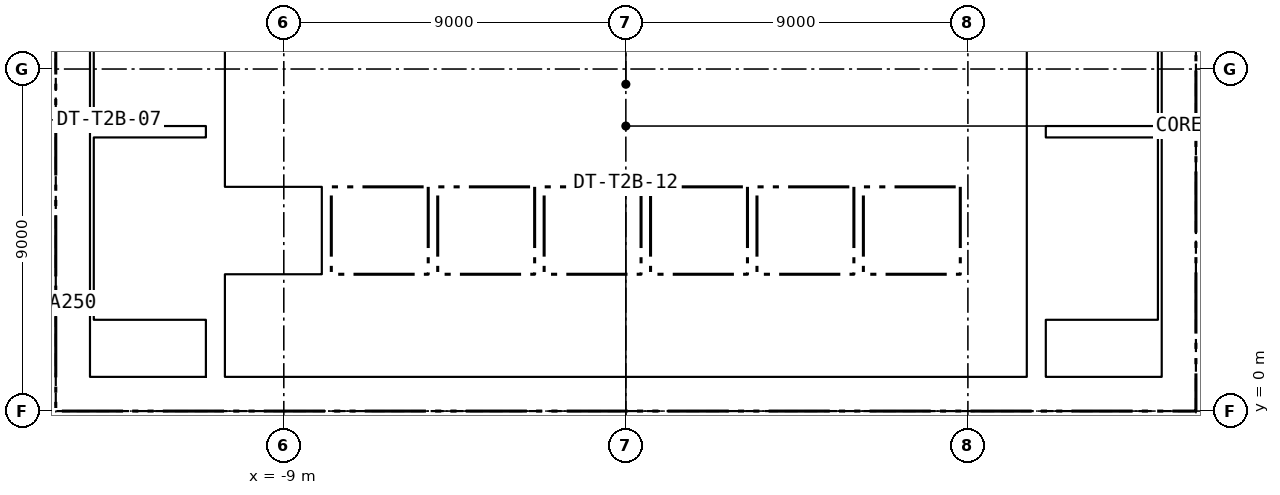
"""IFC4 building model, lengths in metres.
Left out: names, types, materials, properties, quantities, classifications, styles, units other than length and angle.
Written with IfcOpenShell. Run it as: python <this file> out.ifc"""

import sys

from ifc_helpers import new_model, si_unit, direction, frame, frame_2d, origin, place, context, subcontext, project, spatial, rectangle, extrude, element, fill, save


model = new_model("IFC4")
c1 = context("Model", 3, precision=1e-05, world=origin(), true_north=direction((0.0, 1.0)))
c2 = subcontext(c1, "Body", "Model", "MODEL_VIEW")
j1 = project(units=[si_unit("LENGTHUNIT", "METRE"), si_unit("PLANEANGLEUNIT", "RADIAN")], contexts=[c1])
p1 = place(None, origin())
s1 = spatial("IfcSite", under=j1, at=p1, CompositionType="ELEMENT")
p2 = place(p1, origin())
s2 = spatial("IfcBuilding", under=s1, at=p2, CompositionType="ELEMENT")
p3 = place(p2, frame((0.0, 0.0, 91.6)))
s3 = spatial("IfcBuildingStorey", under=s2, at=p3, CompositionType="ELEMENT", Elevation=91.6)
p4 = place(p3, frame((-15.0, 0.45, -0.15), z_axis=(0.0, 0.0, 1.0), x_axis=(1.0, 0.0, 0.0)))
e1 = element("IfcWall", 1, at=p4, inside=s3, PredefinedType="SOLIDWALL", context=c2, shape_type="SweptSolid", body=[
    extrude(rectangle(XDim=30.0, YDim=0.9, at=frame_2d((15.0, 0.0))), origin(), (0.0, 0.0, 1.0), 3.65),
])
p5 = place(p4, frame((5.8, 0.0, 0.15)))
e2 = element("IfcOpeningElement", 2, at=p5, cuts=e1, PredefinedType="OPENING", context=c2, shape_type="SweptSolid", body=[
    extrude(rectangle(XDim=2.4, YDim=2.4, at=frame_2d((1.2, 1.2))), frame((0.0, 0.46, 0.0), z_axis=(0.0, -1.0, 0.0), x_axis=(1.0, 0.0, 0.0)), (0.0, 0.0, 1.0), 0.92),
])
p6 = place(p4, frame((13.8, 0.0, 0.15)))
e3 = element("IfcOpeningElement", 3, at=p6, cuts=e1, PredefinedType="OPENING", context=c2, shape_type="SweptSolid", body=[
    extrude(rectangle(XDim=2.4, YDim=2.4, at=frame_2d((1.2, 1.2))), frame((0.0, 0.46, 0.0), z_axis=(0.0, -1.0, 0.0), x_axis=(1.0, 0.0, 0.0)), (0.0, 0.0, 1.0), 0.92),
])
p7 = place(p4, frame((21.8, 0.0, 0.15)))
e4 = element("IfcOpeningElement", 4, at=p7, cuts=e1, PredefinedType="OPENING", context=c2, shape_type="SweptSolid", body=[
    extrude(rectangle(XDim=2.4, YDim=2.4, at=frame_2d((1.2, 1.2))), frame((0.0, 0.46, 0.0), z_axis=(0.0, -1.0, 0.0), x_axis=(1.0, 0.0, 0.0)), (0.0, 0.0, 1.0), 0.92),
])
p8 = place(p4, frame((1.5, 0.0, 0.15)))
e5 = element("IfcOpeningElement", 5, at=p8, cuts=e1, PredefinedType="OPENING", context=c2, shape_type="SweptSolid", body=[
    extrude(rectangle(XDim=1.2, YDim=2.1, at=frame_2d((0.6, 1.05))), frame((0.0, 0.46, 0.0), z_axis=(0.0, -1.0, 0.0), x_axis=(1.0, 0.0, 0.0)), (0.0, 0.0, 1.0), 0.92),
])
p9 = place(p4, frame((27.3, 0.0, 0.15)))
e6 = element("IfcOpeningElement", 6, at=p9, cuts=e1, PredefinedType="OPENING", context=c2, shape_type="SweptSolid", body=[
    extrude(rectangle(XDim=1.2, YDim=2.1, at=frame_2d((0.6, 1.05))), frame((0.0, 0.46, 0.0), z_axis=(0.0, -1.0, 0.0), x_axis=(1.0, 0.0, 0.0)), (0.0, 0.0, 1.0), 0.92),
])
for number, where, z_axis, x_axis in (
    (7, (-14.55, 0.9, -0.15), (0.0, 0.0, 1.0), (0.0, 1.0, 0.0)),
    (8, (14.55, 0.9, -0.15), (0.0, 0.0, 1.0), (0.0, 1.0, 0.0)),
):
    element("IfcWall", number, at=place(p3, frame(where, z_axis=z_axis, x_axis=x_axis)), inside=s3, PredefinedType="SOLIDWALL", context=c2, shape_type="SweptSolid", body=[
        extrude(rectangle(XDim=13.2, YDim=0.9, at=frame_2d((6.6, 0.0))), origin(), (0.0, 0.0, 1.0), 3.65),
    ])
for number, where, z_axis, x_axis in (
    (9, (-10.8, 0.9, -0.15), (0.0, 0.0, 1.0), (0.0, 1.0, 0.0)),
    (10, (10.8, 0.9, -0.15), (0.0, 0.0, 1.0), (0.0, 1.0, 0.0)),
):
    element("IfcWall", number, at=place(p3, frame(where, z_axis=z_axis, x_axis=x_axis)), inside=s3, PredefinedType="SOLIDWALL", context=c2, shape_type="SweptSolid", body=[
        extrude(rectangle(XDim=13.2, YDim=0.5, at=frame_2d((6.6, 0.0))), origin(), (0.0, 0.0, 1.0), 3.65),
    ])
p10 = place(p3, frame((-10.55, 3.5, 0.0), z_axis=(0.0, 0.0, 1.0), x_axis=(1.0, 0.0, 0.0)))
e11 = element("IfcWall", 11, at=p10, inside=s3, PredefinedType="PARTITIONING", context=c2, shape_type="SweptSolid", body=[
    extrude(rectangle(XDim=21.1, YDim=0.2, at=frame_2d((10.55, 0.0))), origin(), (0.0, 0.0, 1.0), 3.5),
])
p11 = place(p10, frame((0.675, 0.0, 0.0)))
e12 = element("IfcOpeningElement", 12, at=p11, cuts=e11, PredefinedType="OPENING", context=c2, shape_type="SweptSolid", body=[
    extrude(rectangle(XDim=1.2, YDim=2.1, at=frame_2d((0.6, 1.05))), frame((0.0, 0.11, 0.0), z_axis=(0.0, -1.0, 0.0), x_axis=(1.0, 0.0, 0.0)), (0.0, 0.0, 1.0), 0.22),
])
p12 = place(p10, frame((3.475, 0.0, 0.0)))
e13 = element("IfcOpeningElement", 13, at=p12, cuts=e11, PredefinedType="OPENING", context=c2, shape_type="SweptSolid", body=[
    extrude(rectangle(XDim=1.2, YDim=2.1, at=frame_2d((0.6, 1.05))), frame((0.0, 0.11, 0.0), z_axis=(0.0, -1.0, 0.0), x_axis=(1.0, 0.0, 0.0)), (0.0, 0.0, 1.0), 0.22),
])
p13 = place(p10, frame((6.275, 0.0, 0.0)))
e14 = element("IfcOpeningElement", 14, at=p13, cuts=e11, PredefinedType="OPENING", context=c2, shape_type="SweptSolid", body=[
    extrude(rectangle(XDim=1.2, YDim=2.1, at=frame_2d((0.6, 1.05))), frame((0.0, 0.11, 0.0), z_axis=(0.0, -1.0, 0.0), x_axis=(1.0, 0.0, 0.0)), (0.0, 0.0, 1.0), 0.22),
])
p14 = place(p10, frame((9.075, 0.0, 0.0)))
e15 = element("IfcOpeningElement", 15, at=p14, cuts=e11, PredefinedType="OPENING", context=c2, shape_type="SweptSolid", body=[
    extrude(rectangle(XDim=1.2, YDim=2.1, at=frame_2d((0.6, 1.05))), frame((0.0, 0.11, 0.0), z_axis=(0.0, -1.0, 0.0), x_axis=(1.0, 0.0, 0.0)), (0.0, 0.0, 1.0), 0.22),
])
p15 = place(p10, frame((11.875, 0.0, 0.0)))
e16 = element("IfcOpeningElement", 16, at=p15, cuts=e11, PredefinedType="OPENING", context=c2, shape_type="SweptSolid", body=[
    extrude(rectangle(XDim=1.2, YDim=2.1, at=frame_2d((0.6, 1.05))), frame((0.0, 0.11, 0.0), z_axis=(0.0, -1.0, 0.0), x_axis=(1.0, 0.0, 0.0)), (0.0, 0.0, 1.0), 0.22),
])
p16 = place(p10, frame((14.675, 0.0, 0.0)))
e17 = element("IfcOpeningElement", 17, at=p16, cuts=e11, PredefinedType="OPENING", context=c2, shape_type="SweptSolid", body=[
    extrude(rectangle(XDim=1.2, YDim=2.1, at=frame_2d((0.6, 1.05))), frame((0.0, 0.11, 0.0), z_axis=(0.0, -1.0, 0.0), x_axis=(1.0, 0.0, 0.0)), (0.0, 0.0, 1.0), 0.22),
])
p17 = place(p10, frame((17.475, 0.0, 0.0)))
e18 = element("IfcOpeningElement", 18, at=p17, cuts=e11, PredefinedType="OPENING", context=c2, shape_type="SweptSolid", body=[
    extrude(rectangle(XDim=1.2, YDim=2.1, at=frame_2d((0.6, 1.05))), frame((0.0, 0.11, 0.0), z_axis=(0.0, -1.0, 0.0), x_axis=(1.0, 0.0, 0.0)), (0.0, 0.0, 1.0), 0.22),
])
p18 = place(p10, frame((19.9, 0.0, 0.0)))
e19 = element("IfcOpeningElement", 19, at=p18, cuts=e11, PredefinedType="OPENING", context=c2, shape_type="SweptSolid", body=[
    extrude(rectangle(XDim=0.9, YDim=2.1, at=frame_2d((0.45, 1.05))), frame((0.0, 0.11, 0.0), z_axis=(0.0, -1.0, 0.0), x_axis=(1.0, 0.0, 0.0)), (0.0, 0.0, 1.0), 0.22),
])
p19 = place(p3, frame((-10.55, 6.025, 0.0), z_axis=(0.0, 0.0, 1.0), x_axis=(1.0, 0.0, 0.0)))
e20 = element("IfcWall", 20, at=p19, inside=s3, PredefinedType="PARTITIONING", context=c2, shape_type="SweptSolid", body=[
    extrude(rectangle(XDim=21.1, YDim=0.25, at=frame_2d((10.55, 0.0))), origin(), (0.0, 0.0, 1.0), 3.5),
])
p20 = place(p3, frame((-4.125, 8.55, 0.0), z_axis=(0.0, 0.0, 1.0), x_axis=(1.0, 0.0, 0.0)))
e21 = element("IfcWall", 21, at=p20, inside=s3, PredefinedType="PARTITIONING", context=c2, shape_type="SweptSolid", body=[
    extrude(rectangle(XDim=14.675, YDim=0.2, at=frame_2d((7.337, 0.0))), origin(), (0.0, 0.0, 1.0), 3.5),
])
p21 = place(p20, frame((2.438, 0.0, 0.0)))
e22 = element("IfcOpeningElement", 22, at=p21, cuts=e21, PredefinedType="OPENING", context=c2, shape_type="SweptSolid", body=[
    extrude(rectangle(XDim=1.0, YDim=2.1, at=frame_2d((0.5, 1.05))), frame((0.0, 0.11, 0.0), z_axis=(0.0, -1.0, 0.0), x_axis=(1.0, 0.0, 0.0)), (0.0, 0.0, 1.0), 0.22),
])
p22 = place(p20, frame((6.775, 0.0, 0.0)))
e23 = element("IfcOpeningElement", 23, at=p22, cuts=e21, PredefinedType="OPENING", context=c2, shape_type="SweptSolid", body=[
    extrude(rectangle(XDim=1.0, YDim=2.1, at=frame_2d((0.5, 1.05))), frame((0.0, 0.11, 0.0), z_axis=(0.0, -1.0, 0.0), x_axis=(1.0, 0.0, 0.0)), (0.0, 0.0, 1.0), 0.22),
])
p23 = place(p20, frame((10.363, 0.0, 0.0)))
e24 = element("IfcOpeningElement", 24, at=p23, cuts=e21, PredefinedType="OPENING", context=c2, shape_type="SweptSolid", body=[
    extrude(rectangle(XDim=1.0, YDim=2.1, at=frame_2d((0.5, 1.05))), frame((0.0, 0.11, 0.0), z_axis=(0.0, -1.0, 0.0), x_axis=(1.0, 0.0, 0.0)), (0.0, 0.0, 1.0), 0.22),
])
p24 = place(p20, frame((13.475, 0.0, 0.0)))
e25 = element("IfcOpeningElement", 25, at=p24, cuts=e21, PredefinedType="OPENING", context=c2, shape_type="SweptSolid", body=[
    extrude(rectangle(XDim=0.9, YDim=2.1, at=frame_2d((0.45, 1.05))), frame((0.0, 0.11, 0.0), z_axis=(0.0, -1.0, 0.0), x_axis=(1.0, 0.0, 0.0)), (0.0, 0.0, 1.0), 0.22),
])
p25 = place(p3, frame((-4.125, 6.15, 0.0), z_axis=(0.0, 0.0, 1.0), x_axis=(0.0, 1.0, 0.0)))
e26 = element("IfcWall", 26, at=p25, inside=s3, PredefinedType="PARTITIONING", context=c2, shape_type="SweptSolid", body=[
    extrude(rectangle(XDim=4.95, YDim=0.25, at=frame_2d((2.475, 0.0))), origin(), (0.0, 0.0, 1.0), 3.5),
])
p26 = place(p25, frame((3.125, 0.0, 0.0)))
e27 = element("IfcOpeningElement", 27, at=p26, cuts=e26, PredefinedType="OPENING", context=c2, shape_type="SweptSolid", body=[
    extrude(rectangle(XDim=1.2, YDim=2.1, at=frame_2d((0.6, 1.05))), frame((0.0, 0.135, 0.0), z_axis=(0.0, -1.0, 0.0), x_axis=(1.0, 0.0, 0.0)), (0.0, 0.0, 1.0), 0.27),
])
for number, where, z_axis, x_axis in (
    (28, (-7.875, 3.6, 0.0), (0.0, 0.0, 1.0), (0.0, 1.0, 0.0)),
    (29, (-5.075, 3.6, 0.0), (0.0, 0.0, 1.0), (0.0, 1.0, 0.0)),
    (30, (-2.275, 3.6, 0.0), (0.0, 0.0, 1.0), (0.0, 1.0, 0.0)),
    (31, (0.525, 3.6, 0.0), (0.0, 0.0, 1.0), (0.0, 1.0, 0.0)),
    (32, (3.325, 3.6, 0.0), (0.0, 0.0, 1.0), (0.0, 1.0, 0.0)),
    (33, (6.125, 3.6, 0.0), (0.0, 0.0, 1.0), (0.0, 1.0, 0.0)),
    (34, (8.925, 3.6, 0.0), (0.0, 0.0, 1.0), (0.0, 1.0, 0.0)),
):
    element("IfcWall", number, at=place(p3, frame(where, z_axis=z_axis, x_axis=x_axis)), inside=s3, PredefinedType="PARTITIONING", context=c2, shape_type="SweptSolid", body=[
        extrude(rectangle(XDim=2.3, YDim=0.25, at=frame_2d((1.15, 0.0))), origin(), (0.0, 0.0, 1.0), 3.5),
    ])
for number, where, z_axis, x_axis in (
    (35, (1.7, 6.15, 0.0), (0.0, 0.0, 1.0), (0.0, 1.0, 0.0)),
    (36, (4.6, 6.15, 0.0), (0.0, 0.0, 1.0), (0.0, 1.0, 0.0)),
):
    element("IfcWall", number, at=place(p3, frame(where, z_axis=z_axis, x_axis=x_axis)), inside=s3, PredefinedType="PARTITIONING", context=c2, shape_type="SweptSolid", body=[
        extrude(rectangle(XDim=2.3, YDim=0.15, at=frame_2d((1.15, 0.0))), origin(), (0.0, 0.0, 1.0), 3.5),
    ])
p27 = place(p3, frame((8.925, 6.15, 0.0), z_axis=(0.0, 0.0, 1.0), x_axis=(0.0, 1.0, 0.0)))
e37 = element("IfcWall", 37, at=p27, inside=s3, PredefinedType="PARTITIONING", context=c2, shape_type="SweptSolid", body=[
    extrude(rectangle(XDim=2.3, YDim=0.25, at=frame_2d((1.15, 0.0))), origin(), (0.0, 0.0, 1.0), 3.5),
])
p28 = place(p3, frame((-14.0, 7.35, 0.0), z_axis=(0.0, 0.0, 1.0), x_axis=(1.0, 0.0, 0.0)))
e38 = element("IfcWall", 38, at=p28, inside=s3, PredefinedType="SOLIDWALL", context=c2, shape_type="SweptSolid", body=[
    extrude(rectangle(XDim=2.95, YDim=0.3, at=frame_2d((1.475, 0.0))), origin(), (0.0, 0.0, 1.0), 3.5),
])
p29 = place(p3, frame((-14.05, 0.9, 0.0), z_axis=(0.0, 0.0, 1.0), x_axis=(0.0, 1.0, 0.0)))
e39 = element("IfcWall", 39, at=p29, inside=s3, PredefinedType="SOLIDWALL", context=c2, shape_type="SweptSolid", body=[
    extrude(rectangle(XDim=13.2, YDim=0.1, at=frame_2d((6.6, 0.0))), origin(), (0.0, 0.0, 1.0), 3.5),
])
p30 = place(p3, frame((11.05, 7.35, 0.0), z_axis=(0.0, 0.0, 1.0), x_axis=(1.0, 0.0, 0.0)))
e40 = element("IfcWall", 40, at=p30, inside=s3, PredefinedType="SOLIDWALL", context=c2, shape_type="SweptSolid", body=[
    extrude(rectangle(XDim=2.95, YDim=0.3, at=frame_2d((1.475, 0.0))), origin(), (0.0, 0.0, 1.0), 3.5),
])
p31 = place(p3, frame((14.05, 0.9, 0.0), z_axis=(0.0, 0.0, 1.0), x_axis=(0.0, 1.0, 0.0)))
e41 = element("IfcWall", 41, at=p31, inside=s3, PredefinedType="SOLIDWALL", context=c2, shape_type="SweptSolid", body=[
    extrude(rectangle(XDim=13.2, YDim=0.1, at=frame_2d((6.6, 0.0))), origin(), (0.0, 0.0, 1.0), 3.5),
])
p32 = place(p26, origin())
e42 = element("IfcDoor", 42, at=p32, inside=s3, OperationType="SINGLE_SWING_LEFT", PredefinedType="DOOR", context=c2, shape_type="SweptSolid", body=[
    extrude(rectangle(XDim=1.2, YDim=2.1, at=frame_2d((0.6, 1.05))), frame((0.0, 0.025, 0.0), z_axis=(0.0, -1.0, 0.0), x_axis=(1.0, 0.0, 0.0)), (0.0, 0.0, 1.0), 0.05),
])
fill(e27, e42)
p33 = place(p11, origin())
e43 = element("IfcDoor", 43, at=p33, inside=s3, OperationType="DOUBLE_DOOR_SLIDING", PredefinedType="DOOR", context=c2, shape_type="SweptSolid", body=[
    extrude(rectangle(XDim=1.2, YDim=2.1, at=frame_2d((0.6, 1.05))), frame((0.0, 0.025, 0.0), z_axis=(0.0, -1.0, 0.0), x_axis=(1.0, 0.0, 0.0)), (0.0, 0.0, 1.0), 0.05),
])
fill(e12, e43)
p34 = place(p12, origin())
e44 = element("IfcDoor", 44, at=p34, inside=s3, OperationType="DOUBLE_DOOR_SLIDING", PredefinedType="DOOR", context=c2, shape_type="SweptSolid", body=[
    extrude(rectangle(XDim=1.2, YDim=2.1, at=frame_2d((0.6, 1.05))), frame((0.0, 0.025, 0.0), z_axis=(0.0, -1.0, 0.0), x_axis=(1.0, 0.0, 0.0)), (0.0, 0.0, 1.0), 0.05),
])
fill(e13, e44)
p35 = place(p13, origin())
e45 = element("IfcDoor", 45, at=p35, inside=s3, OperationType="DOUBLE_DOOR_SLIDING", PredefinedType="DOOR", context=c2, shape_type="SweptSolid", body=[
    extrude(rectangle(XDim=1.2, YDim=2.1, at=frame_2d((0.6, 1.05))), frame((0.0, 0.025, 0.0), z_axis=(0.0, -1.0, 0.0), x_axis=(1.0, 0.0, 0.0)), (0.0, 0.0, 1.0), 0.05),
])
fill(e14, e45)
p36 = place(p14, origin())
e46 = element("IfcDoor", 46, at=p36, inside=s3, OperationType="DOUBLE_DOOR_SLIDING", PredefinedType="DOOR", context=c2, shape_type="SweptSolid", body=[
    extrude(rectangle(XDim=1.2, YDim=2.1, at=frame_2d((0.6, 1.05))), frame((0.0, 0.025, 0.0), z_axis=(0.0, -1.0, 0.0), x_axis=(1.0, 0.0, 0.0)), (0.0, 0.0, 1.0), 0.05),
])
fill(e15, e46)
p37 = place(p15, origin())
e47 = element("IfcDoor", 47, at=p37, inside=s3, OperationType="DOUBLE_DOOR_SLIDING", PredefinedType="DOOR", context=c2, shape_type="SweptSolid", body=[
    extrude(rectangle(XDim=1.2, YDim=2.1, at=frame_2d((0.6, 1.05))), frame((0.0, 0.025, 0.0), z_axis=(0.0, -1.0, 0.0), x_axis=(1.0, 0.0, 0.0)), (0.0, 0.0, 1.0), 0.05),
])
fill(e16, e47)
p38 = place(p16, origin())
e48 = element("IfcDoor", 48, at=p38, inside=s3, OperationType="DOUBLE_DOOR_SLIDING", PredefinedType="DOOR", context=c2, shape_type="SweptSolid", body=[
    extrude(rectangle(XDim=1.2, YDim=2.1, at=frame_2d((0.6, 1.05))), frame((0.0, 0.025, 0.0), z_axis=(0.0, -1.0, 0.0), x_axis=(1.0, 0.0, 0.0)), (0.0, 0.0, 1.0), 0.05),
])
fill(e17, e48)
p39 = place(p17, origin())
e49 = element("IfcDoor", 49, at=p39, inside=s3, OperationType="DOUBLE_DOOR_SLIDING", PredefinedType="DOOR", context=c2, shape_type="SweptSolid", body=[
    extrude(rectangle(XDim=1.2, YDim=2.1, at=frame_2d((0.6, 1.05))), frame((0.0, 0.025, 0.0), z_axis=(0.0, -1.0, 0.0), x_axis=(1.0, 0.0, 0.0)), (0.0, 0.0, 1.0), 0.05),
])
fill(e18, e49)
p40 = place(p18, origin())
e50 = element("IfcDoor", 50, at=p40, inside=s3, OperationType="SINGLE_SWING_RIGHT", PredefinedType="DOOR", context=c2, shape_type="SweptSolid", body=[
    extrude(rectangle(XDim=0.9, YDim=2.1, at=frame_2d((0.45, 1.05))), frame((0.0, 0.025, 0.0), z_axis=(0.0, -1.0, 0.0), x_axis=(1.0, 0.0, 0.0)), (0.0, 0.0, 1.0), 0.05),
])
fill(e19, e50)
p41 = place(p21, origin())
e51 = element("IfcDoor", 51, at=p41, inside=s3, OperationType="SINGLE_SWING_LEFT", PredefinedType="DOOR", context=c2, shape_type="SweptSolid", body=[
    extrude(rectangle(XDim=1.0, YDim=2.1, at=frame_2d((0.5, 1.05))), frame((0.0, 0.025, 0.0), z_axis=(0.0, -1.0, 0.0), x_axis=(1.0, 0.0, 0.0)), (0.0, 0.0, 1.0), 0.05),
])
fill(e22, e51)
p42 = place(p22, origin())
e52 = element("IfcDoor", 52, at=p42, inside=s3, OperationType="SINGLE_SWING_RIGHT", PredefinedType="DOOR", context=c2, shape_type="SweptSolid", body=[
    extrude(rectangle(XDim=1.0, YDim=2.1, at=frame_2d((0.5, 1.05))), frame((0.0, 0.025, 0.0), z_axis=(0.0, -1.0, 0.0), x_axis=(1.0, 0.0, 0.0)), (0.0, 0.0, 1.0), 0.05),
])
fill(e23, e52)
p43 = place(p23, origin())
e53 = element("IfcDoor", 53, at=p43, inside=s3, OperationType="SINGLE_SWING_LEFT", PredefinedType="DOOR", context=c2, shape_type="SweptSolid", body=[
    extrude(rectangle(XDim=1.0, YDim=2.1, at=frame_2d((0.5, 1.05))), frame((0.0, 0.025, 0.0), z_axis=(0.0, -1.0, 0.0), x_axis=(1.0, 0.0, 0.0)), (0.0, 0.0, 1.0), 0.05),
])
fill(e24, e53)
p44 = place(p24, origin())
e54 = element("IfcDoor", 54, at=p44, inside=s3, OperationType="SINGLE_SWING_RIGHT", PredefinedType="DOOR", context=c2, shape_type="SweptSolid", body=[
    extrude(rectangle(XDim=0.9, YDim=2.1, at=frame_2d((0.45, 1.05))), frame((0.0, 0.025, 0.0), z_axis=(0.0, -1.0, 0.0), x_axis=(1.0, 0.0, 0.0)), (0.0, 0.0, 1.0), 0.05),
])
fill(e25, e54)
p45 = place(p5, origin())
e55 = element("IfcDoor", 55, at=p45, inside=s3, OperationType="DOUBLE_DOOR_DOUBLE_SWING", PredefinedType="DOOR", context=c2, shape_type="SweptSolid", body=[
    extrude(rectangle(XDim=2.4, YDim=2.4, at=frame_2d((1.2, 1.2))), frame((0.0, 0.025, 0.0), z_axis=(0.0, -1.0, 0.0), x_axis=(1.0, 0.0, 0.0)), (0.0, 0.0, 1.0), 0.05),
])
fill(e2, e55)
p46 = place(p6, origin())
e56 = element("IfcDoor", 56, at=p46, inside=s3, OperationType="DOUBLE_DOOR_DOUBLE_SWING", PredefinedType="DOOR", context=c2, shape_type="SweptSolid", body=[
    extrude(rectangle(XDim=2.4, YDim=2.4, at=frame_2d((1.2, 1.2))), frame((0.0, 0.025, 0.0), z_axis=(0.0, -1.0, 0.0), x_axis=(1.0, 0.0, 0.0)), (0.0, 0.0, 1.0), 0.05),
])
fill(e3, e56)
p47 = place(p7, origin())
e57 = element("IfcDoor", 57, at=p47, inside=s3, OperationType="DOUBLE_DOOR_DOUBLE_SWING", PredefinedType="DOOR", context=c2, shape_type="SweptSolid", body=[
    extrude(rectangle(XDim=2.4, YDim=2.4, at=frame_2d((1.2, 1.2))), frame((0.0, 0.025, 0.0), z_axis=(0.0, -1.0, 0.0), x_axis=(1.0, 0.0, 0.0)), (0.0, 0.0, 1.0), 0.05),
])
fill(e4, e57)
p48 = place(p8, origin())
e58 = element("IfcDoor", 58, at=p48, inside=s3, OperationType="SINGLE_SWING_LEFT", PredefinedType="DOOR", context=c2, shape_type="SweptSolid", body=[
    extrude(rectangle(XDim=1.2, YDim=2.1, at=frame_2d((0.6, 1.05))), frame((0.0, 0.025, 0.0), z_axis=(0.0, -1.0, 0.0), x_axis=(1.0, 0.0, 0.0)), (0.0, 0.0, 1.0), 0.05),
])
fill(e5, e58)
p49 = place(p9, origin())
e59 = element("IfcDoor", 59, at=p49, inside=s3, OperationType="SINGLE_SWING_RIGHT", PredefinedType="DOOR", context=c2, shape_type="SweptSolid", body=[
    extrude(rectangle(XDim=1.2, YDim=2.1, at=frame_2d((0.6, 1.05))), frame((0.0, 0.025, 0.0), z_axis=(0.0, -1.0, 0.0), x_axis=(1.0, 0.0, 0.0)), (0.0, 0.0, 1.0), 0.05),
])
fill(e6, e59)
save(model, sys.argv[1])
